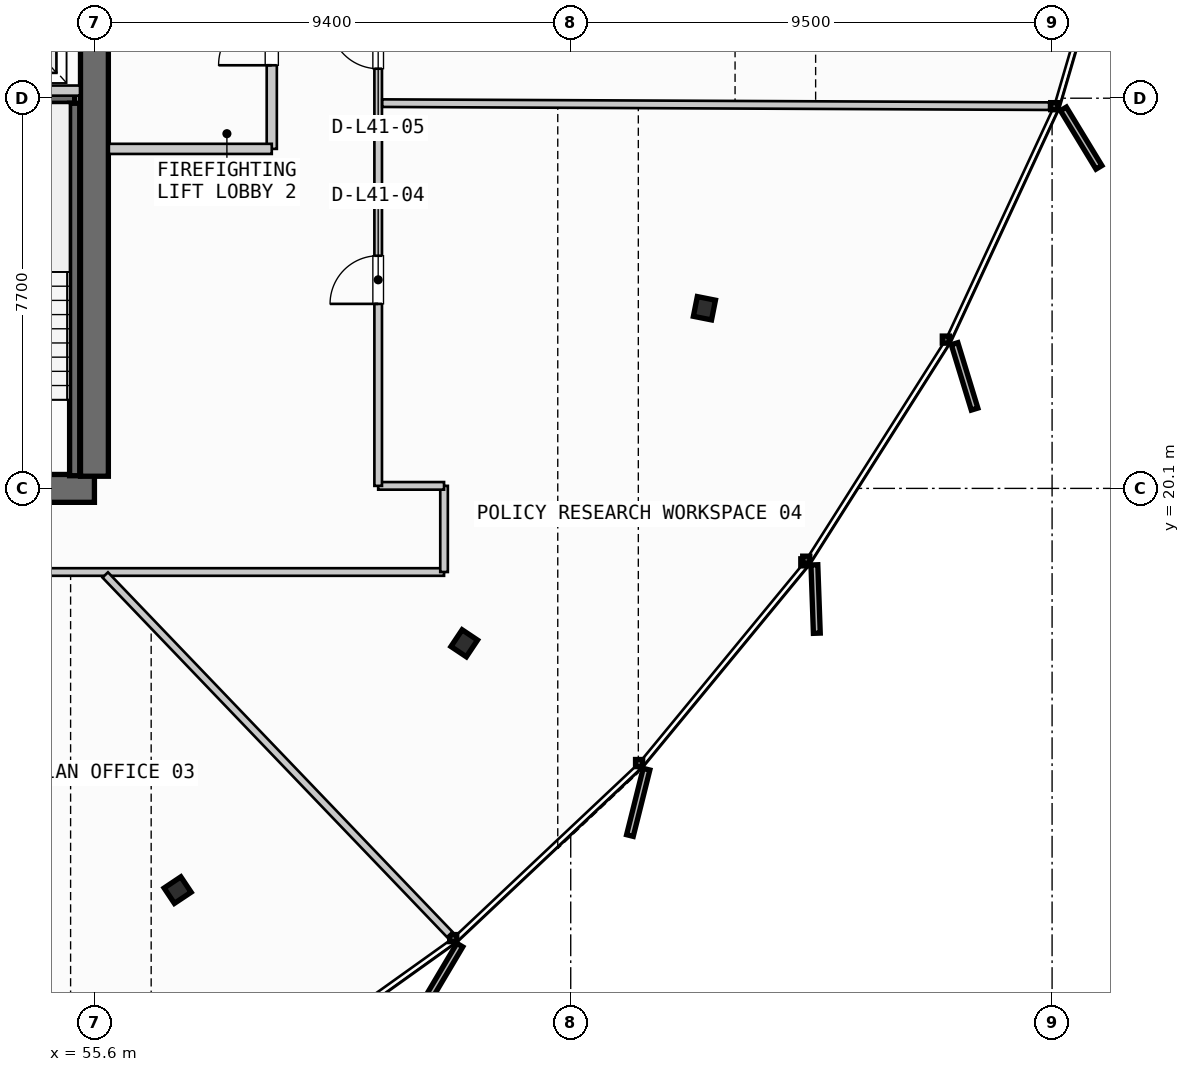
"""IFC4 building model, lengths in metres.
Left out: names, types, materials, properties, quantities, classifications, styles, units other than length and angle.
Written with IfcOpenShell. Run it as: python <this file> out.ifc"""

import sys

from ifc_helpers import new_model, si_unit, direction, frame, frame_2d, origin, origin_2d, place, context, subcontext, project, spatial, rectangle, i_section, extrude, source, transform, mapped, element, fill, save


model = new_model("IFC4")
c1 = context("Model", 3, precision=1e-05, world=origin(), true_north=direction((0.0, 1.0)))
c2 = subcontext(c1, "Body", "Model", "MODEL_VIEW")
j1 = project(units=[si_unit("LENGTHUNIT", "METRE"), si_unit("PLANEANGLEUNIT", "RADIAN")], contexts=[c1])
p1 = place(None, origin())
s1 = spatial("IfcSite", under=j1, at=p1, CompositionType="ELEMENT")
p2 = place(p1, origin())
s2 = spatial("IfcBuilding", under=s1, at=p2, CompositionType="ELEMENT")
p3 = place(p2, frame((0.0, 0.0, 160.75)))
s3 = spatial("IfcBuildingStorey", under=s2, at=p3, CompositionType="ELEMENT", Elevation=160.75)
p4 = place(p3, frame((38.0, 20.1, 0.0), z_axis=(0.0, 0.0, 1.0), x_axis=(1.0, 0.0, 0.0)))
e1 = element("IfcWall", 1, at=p4, inside=s3, PredefinedType="SHEAR", context=c2, shape_type="SweptSolid", body=[
    extrude(rectangle(XDim=17.6, YDim=0.55, at=frame_2d((8.8, 0.0))), origin(), (0.0, 0.0, 1.0), 3.3),
])
p5 = place(p4, frame((1.4, 0.0, 0.0)))
e2 = element("IfcOpeningElement", 2, at=p5, cuts=e1, PredefinedType="OPENING", context=c2, shape_type="SweptSolid", body=[
    extrude(rectangle(XDim=1.05, YDim=2.15, at=frame_2d((0.525, 1.075))), frame((0.0, 0.285, 0.0), z_axis=(0.0, -1.0, 0.0), x_axis=(1.0, 0.0, 0.0)), (0.0, 0.0, 1.0), 0.57),
])
p6 = place(p4, frame((15.15, 0.0, 0.0)))
e3 = element("IfcOpeningElement", 3, at=p6, cuts=e1, PredefinedType="OPENING", context=c2, shape_type="SweptSolid", body=[
    extrude(rectangle(XDim=1.05, YDim=2.15, at=frame_2d((0.525, 1.075))), frame((0.0, 0.285, 0.0), z_axis=(0.0, -1.0, 0.0), x_axis=(1.0, 0.0, 0.0)), (0.0, 0.0, 1.0), 0.57),
])
p7 = place(p4, frame((5.25, 0.0, 0.0)))
e4 = element("IfcOpeningElement", 4, at=p7, cuts=e1, PredefinedType="OPENING", context=c2, shape_type="SweptSolid", body=[
    extrude(rectangle(XDim=0.95, YDim=2.15, at=frame_2d((0.475, 1.075))), frame((0.0, 0.285, 0.0), z_axis=(0.0, -1.0, 0.0), x_axis=(1.0, 0.0, 0.0)), (0.0, 0.0, 1.0), 0.57),
])
p8 = place(p4, frame((11.4, 0.0, 0.0)))
e5 = element("IfcOpeningElement", 5, at=p8, cuts=e1, PredefinedType="OPENING", context=c2, shape_type="SweptSolid", body=[
    extrude(rectangle(XDim=0.95, YDim=2.15, at=frame_2d((0.475, 1.075))), frame((0.0, 0.285, 0.0), z_axis=(0.0, -1.0, 0.0), x_axis=(1.0, 0.0, 0.0)), (0.0, 0.0, 1.0), 0.57),
])
p9 = place(p3, frame((55.6, 20.34, 0.0), z_axis=(0.0, 0.0, 1.0), x_axis=(0.0, 1.0, 0.0)))
e6 = element("IfcWall", 6, at=p9, inside=s3, PredefinedType="SHEAR", context=c2, shape_type="SweptSolid", body=[
    extrude(rectangle(XDim=14.92, YDim=0.55, at=frame_2d((7.46, 0.0))), origin(), (0.0, 0.0, 1.0), 3.3),
])
p10 = place(p9, frame((12.71, 0.0, 0.0)))
e7 = element("IfcOpeningElement", 7, at=p10, cuts=e6, PredefinedType="OPENING", context=c2, shape_type="SweptSolid", body=[
    extrude(rectangle(XDim=1.05, YDim=2.15, at=frame_2d((0.525, 1.075))), frame((0.0, 0.285, 0.0), z_axis=(0.0, -1.0, 0.0), x_axis=(1.0, 0.0, 0.0)), (0.0, 0.0, 1.0), 0.57),
])
p11 = place(p9, frame((8.61, 0.0, 0.0)))
e8 = element("IfcOpeningElement", 8, at=p11, cuts=e6, PredefinedType="OPENING", context=c2, shape_type="SweptSolid", body=[
    extrude(rectangle(XDim=1.1, YDim=2.2, at=frame_2d((0.55, 1.1))), frame((0.0, 0.285, 0.0), z_axis=(0.0, -1.0, 0.0), x_axis=(1.0, 0.0, 0.0)), (0.0, 0.0, 1.0), 0.57),
])
m1 = source(origin(), c2, "Body", "SweptSolid", [
    extrude(i_section(OverallWidth=0.397, OverallDepth=0.365, WebThickness=0.028, FlangeThickness=0.044, FilletRadius=0.015, at=origin_2d()), origin(), (0.0, 0.0, 1.0), 3.3),
])
for number, where, z_axis, x_axis in (
    (9, (57.242, 12.172, 0.0), (0.0, 0.0, 1.0), (0.556, -0.831, 0.0)),
    (10, (62.899, 17.043, 0.0), (0.0, 0.0, 1.0), (0.831, -0.556, 0.0)),
    (11, (67.639, 23.655, 0.0), (0.0, 0.0, 1.0), (0.981, -0.195, 0.0)),
):
    element("IfcColumn", number, at=place(p3, frame(where, z_axis=z_axis, x_axis=x_axis)), inside=s3, PredefinedType="COLUMN", context=c2, shape_type="MappedRepresentation", body=[
        mapped(m1, transform((0.0, 0.0, 0.0), scale=1.0)),
    ])
p12 = place(p3, frame((52.15, 27.8, 0.0), z_axis=(0.0, 0.0, 1.0), x_axis=(1.0, 0.0, 0.0)))
e12 = element("IfcWall", 12, at=p12, inside=s3, PredefinedType="SHEAR", context=c2, shape_type="SweptSolid", body=[
    extrude(rectangle(XDim=3.06, YDim=0.2, at=frame_2d((1.53, 0.0))), origin(), (0.0, 0.0, 1.0), 3.3),
])
p13 = place(p3, frame((55.21, 27.7, 0.0), z_axis=(0.0, 0.0, 1.0), x_axis=(0.0, -1.0, 0.0)))
e13 = element("IfcWall", 13, at=p13, inside=s3, PredefinedType="SHEAR", context=c2, shape_type="SweptSolid", body=[
    extrude(rectangle(XDim=7.35, YDim=0.2, at=frame_2d((3.675, 0.0))), origin(), (0.0, 0.0, 1.0), 3.3),
])
p14 = place(p3, frame((52.45, 27.95, 0.0), z_axis=(0.0, 0.0, 1.0), x_axis=(1.0, 0.0, 0.0)))
e14 = element("IfcWall", 14, at=p14, inside=s3, PredefinedType="PARTITIONING", context=c2, shape_type="SweptSolid", body=[
    extrude(rectangle(XDim=2.865, YDim=0.2, at=frame_2d((1.433, 0.0))), origin(), (0.0, 0.0, 1.0), 2.28),
])
p15 = place(p3, frame((59.1, 26.8, 0.0), z_axis=(0.0, 0.0, 1.0), x_axis=(0.0, 1.0, 0.0)))
e15 = element("IfcWall", 15, at=p15, inside=s3, PredefinedType="PARTITIONING", context=c2, shape_type="SweptSolid", body=[
    extrude(rectangle(XDim=4.4, YDim=0.2, at=frame_2d((2.2, 0.0))), origin(), (0.0, 0.0, 1.0), 2.28),
])
p16 = place(p15, frame((1.65, 0.0, 0.0)))
e16 = element("IfcOpeningElement", 16, at=p16, cuts=e15, PredefinedType="OPENING", context=c2, shape_type="SweptSolid", body=[
    extrude(rectangle(XDim=1.05, YDim=2.15, at=frame_2d((0.525, 1.075))), frame((0.0, 0.11, 0.0), z_axis=(0.0, -1.0, 0.0), x_axis=(1.0, 0.0, 0.0)), (0.0, 0.0, 1.0), 0.22),
])
p17 = place(p3, frame((55.885, 26.8, 0.0), z_axis=(0.0, 0.0, 1.0), x_axis=(1.0, 0.0, 0.0)))
e17 = element("IfcWall", 17, at=p17, inside=s3, PredefinedType="PARTITIONING", context=c2, shape_type="SweptSolid", body=[
    extrude(rectangle(XDim=3.215, YDim=0.2, at=frame_2d((1.607, 0.0))), origin(), (0.0, 0.0, 1.0), 2.28),
])
p18 = place(p3, frame((31.1, 18.45, 0.0), z_axis=(0.0, 0.0, 1.0), x_axis=(1.0, 0.0, 0.0)))
e18 = element("IfcWall", 18, at=p18, inside=s3, PredefinedType="PARTITIONING", context=c2, shape_type="SweptSolid", body=[
    extrude(rectangle(XDim=31.4, YDim=0.15, at=frame_2d((15.7, 0.0))), origin(), (0.0, 0.0, 1.0), 2.28),
])
p19 = place(p18, frame((7.441, 0.0, 0.0)))
e19 = element("IfcOpeningElement", 19, at=p19, cuts=e18, PredefinedType="OPENING", context=c2, shape_type="SweptSolid", body=[
    extrude(rectangle(XDim=0.95, YDim=2.15, at=frame_2d((0.475, 1.075))), frame((0.0, 0.085, 0.0), z_axis=(0.0, -1.0, 0.0), x_axis=(1.0, 0.0, 0.0)), (0.0, 0.0, 1.0), 0.17),
])
p20 = place(p18, frame((14.784, 0.0, 0.0)))
e20 = element("IfcOpeningElement", 20, at=p20, cuts=e18, PredefinedType="OPENING", context=c2, shape_type="SweptSolid", body=[
    extrude(rectangle(XDim=0.95, YDim=2.15, at=frame_2d((0.475, 1.075))), frame((0.0, 0.085, 0.0), z_axis=(0.0, -1.0, 0.0), x_axis=(1.0, 0.0, 0.0)), (0.0, 0.0, 1.0), 0.17),
])
p21 = place(p18, frame((21.401, 0.0, 0.0)))
e21 = element("IfcOpeningElement", 21, at=p21, cuts=e18, PredefinedType="OPENING", context=c2, shape_type="SweptSolid", body=[
    extrude(rectangle(XDim=0.95, YDim=2.15, at=frame_2d((0.475, 1.075))), frame((0.0, 0.085, 0.0), z_axis=(0.0, -1.0, 0.0), x_axis=(1.0, 0.0, 0.0)), (0.0, 0.0, 1.0), 0.17),
])
p22 = place(p3, frame((62.5, 18.45, 0.0), z_axis=(0.0, 0.0, 1.0), x_axis=(0.0, 1.0, 0.0)))
e22 = element("IfcWall", 22, at=p22, inside=s3, PredefinedType="PARTITIONING", context=c2, shape_type="SweptSolid", body=[
    extrude(rectangle(XDim=1.7, YDim=0.15, at=frame_2d((0.85, 0.0))), origin(), (0.0, 0.0, 1.0), 2.28),
])
p23 = place(p3, frame((62.5, 20.15, 0.0), z_axis=(0.0, 0.0, 1.0), x_axis=(-1.0, 0.0, 0.0)))
e23 = element("IfcWall", 23, at=p23, inside=s3, PredefinedType="PARTITIONING", context=c2, shape_type="SweptSolid", body=[
    extrude(rectangle(XDim=1.3, YDim=0.15, at=frame_2d((0.65, 0.0))), origin(), (0.0, 0.0, 1.0), 2.28),
])
p24 = place(p3, frame((61.2, 20.15, 0.0), z_axis=(0.0, 0.0, 1.0), x_axis=(0.0, 1.0, 0.0)))
e24 = element("IfcWall", 24, at=p24, inside=s3, PredefinedType="PARTITIONING", context=c2, shape_type="SweptSolid", body=[
    extrude(rectangle(XDim=15.3, YDim=0.15, at=frame_2d((7.65, 0.0))), origin(), (0.0, 0.0, 1.0), 2.28),
])
p25 = place(p24, frame((3.591, 0.0, 0.0)))
e25 = element("IfcOpeningElement", 25, at=p25, cuts=e24, PredefinedType="OPENING", context=c2, shape_type="SweptSolid", body=[
    extrude(rectangle(XDim=0.95, YDim=2.15, at=frame_2d((0.475, 1.075))), frame((0.0, 0.085, 0.0), z_axis=(0.0, -1.0, 0.0), x_axis=(1.0, 0.0, 0.0)), (0.0, 0.0, 1.0), 0.17),
])
p26 = place(p24, frame((8.232, 0.0, 0.0)))
e26 = element("IfcOpeningElement", 26, at=p26, cuts=e24, PredefinedType="OPENING", context=c2, shape_type="SweptSolid", body=[
    extrude(rectangle(XDim=0.95, YDim=2.15, at=frame_2d((0.475, 1.075))), frame((0.0, 0.085, 0.0), z_axis=(0.0, -1.0, 0.0), x_axis=(1.0, 0.0, 0.0)), (0.0, 0.0, 1.0), 0.17),
])
p27 = place(p24, frame((11.814, 0.0, 0.0)))
e27 = element("IfcOpeningElement", 27, at=p27, cuts=e24, PredefinedType="OPENING", context=c2, shape_type="SweptSolid", body=[
    extrude(rectangle(XDim=0.95, YDim=2.15, at=frame_2d((0.475, 1.075))), frame((0.0, 0.085, 0.0), z_axis=(0.0, -1.0, 0.0), x_axis=(1.0, 0.0, 0.0)), (0.0, 0.0, 1.0), 0.17),
])
p28 = place(p3, frame((55.813, 18.392, 0.0), z_axis=(0.0, 0.0, 1.0), x_axis=(0.691889713395, -0.722003202554, 0.0)))
e28 = element("IfcWall", 28, at=p28, inside=s3, PredefinedType="PARTITIONING", context=c2, shape_type="SweptSolid", body=[
    extrude(rectangle(XDim=9.826, YDim=0.15, at=frame_2d((4.913, 0.0))), origin(), (0.0, 0.0, 1.0), 2.28),
])
p29 = place(p3, frame((61.28, 27.702, 0.0), z_axis=(0.0, 0.0, 1.0), x_axis=(0.999989924384, -0.004489001126, 0.0)))
e29 = element("IfcWall", 29, at=p29, inside=s3, PredefinedType="PARTITIONING", context=c2, shape_type="SweptSolid", body=[
    extrude(rectangle(XDim=13.162, YDim=0.15, at=frame_2d((6.581, 0.0))), origin(), (0.0, 0.0, 1.0), 2.28),
])
m2 = source(origin(), c2, "Body", "SweptSolid", [
    extrude(rectangle(XDim=1.05, YDim=2.15, at=frame_2d((0.525, 1.075))), frame((0.0, 0.025, 0.0), z_axis=(0.0, -1.0, 0.0), x_axis=(1.0, 0.0, 0.0)), (0.0, 0.0, 1.0), 0.05),
])
p30 = place(p16, origin())
e30 = element("IfcDoor", 30, at=p30, inside=s3, OperationType="SINGLE_SWING_LEFT", PredefinedType="DOOR", context=c2, shape_type="MappedRepresentation", body=[
    mapped(m2, transform((0.0, 0.0, 0.0), scale=1.0)),
])
fill(e16, e30)
m3 = source(origin(), c2, "Body", "SweptSolid", [
    extrude(rectangle(XDim=0.95, YDim=2.15, at=frame_2d((0.475, 1.075))), frame((0.0, 0.025, 0.0), z_axis=(0.0, -1.0, 0.0), x_axis=(1.0, 0.0, 0.0)), (0.0, 0.0, 1.0), 0.05),
])
p31 = place(p25, origin())
e31 = element("IfcDoor", 31, at=p31, inside=s3, OperationType="SINGLE_SWING_LEFT", PredefinedType="DOOR", context=c2, shape_type="MappedRepresentation", body=[
    mapped(m3, transform((0.0, 0.0, 0.0), scale=1.0)),
])
fill(e25, e31)
p32 = place(p26, origin())
e32 = element("IfcDoor", 32, at=p32, inside=s3, OperationType="SINGLE_SWING_RIGHT", PredefinedType="DOOR", context=c2, shape_type="MappedRepresentation", body=[
    mapped(m3, transform((0.0, 0.0, 0.0), scale=1.0)),
])
fill(e26, e32)
save(model, sys.argv[1])
